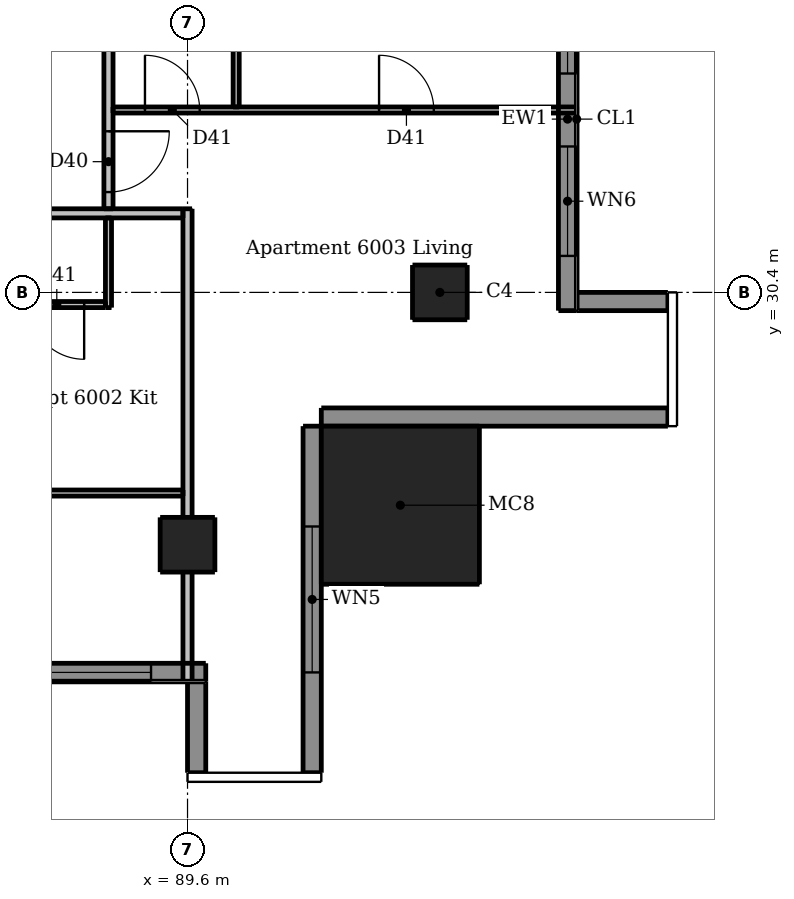
"""IFC4 building model, lengths in metres.
Left out: names, types, materials, properties, quantities, classifications, styles, units other than length and angle.
Written with IfcOpenShell. Run it as: python <this file> out.ifc"""

import sys

from ifc_helpers import new_model, si_unit, direction, frame, frame_2d, origin, origin_2d, place, context, subcontext, project, spatial, rectangle, extrude, element, fill, save


model = new_model("IFC4")
c1 = context("Model", 3, precision=1e-05, world=origin(), true_north=direction((0.0, 1.0)))
c2 = subcontext(c1, "Body", "Model", "MODEL_VIEW")
j1 = project(units=[si_unit("LENGTHUNIT", "METRE"), si_unit("PLANEANGLEUNIT", "RADIAN")], contexts=[c1])
p1 = place(None, origin())
s1 = spatial("IfcSite", under=j1, at=p1, CompositionType="ELEMENT")
p2 = place(p1, origin())
s2 = spatial("IfcBuilding", under=s1, at=p2, CompositionType="ELEMENT")
p3 = place(p2, frame((0.0, 0.0, 223.3)))
s3 = spatial("IfcBuildingStorey", under=s2, at=p3, CompositionType="ELEMENT", Elevation=223.3)
for number, where, z_axis, x_axis in (
    (1, (89.6, 26.25, 0.0), (0.0, 0.0, 1.0), (1.0, 0.0, 0.0)),
    (2, (93.75, 30.4, 0.0), (0.0, 0.0, 1.0), (1.0, 0.0, 0.0)),
):
    element("IfcColumn", number, at=place(p3, frame(where, z_axis=z_axis, x_axis=x_axis)), inside=s3, PredefinedType="COLUMN", context=c2, shape_type="SweptSolid", body=[
        extrude(rectangle(XDim=0.9, YDim=0.9, at=origin_2d()), origin(), (0.0, 0.0, 1.0), 3.05),
    ])
p4 = place(p3, frame((93.1, 26.9, 0.0), z_axis=(0.0, 0.0, 1.0), x_axis=(1.0, 0.0, 0.0)))
e3 = element("IfcColumn", 3, at=p4, inside=s3, PredefinedType="COLUMN", context=c2, shape_type="SweptSolid", body=[
    extrude(rectangle(XDim=2.6, YDim=2.6, at=origin_2d()), origin(), (0.0, 0.0, 1.0), 3.3),
])
p5 = place(p3, frame((89.75, 24.0, 0.0), z_axis=(0.0, 0.0, 1.0), x_axis=(0.0, -1.0, 0.0)))
e4 = element("IfcWall", 4, at=p5, inside=s3, PredefinedType="SOLIDWALL", context=c2, shape_type="SweptSolid", body=[
    extrude(rectangle(XDim=1.5, YDim=0.3, at=frame_2d((0.75, 0.0))), origin(), (0.0, 0.0, 1.0), 3.05),
])
p6 = place(p3, frame((91.65, 22.5, 0.0), z_axis=(0.0, 0.0, 1.0), x_axis=(0.0, 1.0, 0.0)))
e5 = element("IfcWall", 5, at=p6, inside=s3, PredefinedType="SOLIDWALL", context=c2, shape_type="SweptSolid", body=[
    extrude(rectangle(XDim=5.7, YDim=0.3, at=frame_2d((2.85, 0.0))), origin(), (0.0, 0.0, 1.0), 3.05),
])
p7 = place(p6, frame((1.65, 0.0, 0.15)))
e6 = element("IfcOpeningElement", 6, at=p7, cuts=e5, PredefinedType="OPENING", context=c2, shape_type="SweptSolid", body=[
    extrude(rectangle(XDim=2.4, YDim=2.1, at=frame_2d((1.2, 1.05))), frame((0.0, 0.16, 0.0), z_axis=(0.0, -1.0, 0.0), x_axis=(1.0, 0.0, 0.0)), (0.0, 0.0, 1.0), 0.32),
])
p8 = place(p3, frame((91.8, 28.35, 0.0), z_axis=(0.0, 0.0, 1.0), x_axis=(1.0, 0.0, 0.0)))
e7 = element("IfcWall", 7, at=p8, inside=s3, PredefinedType="SOLIDWALL", context=c2, shape_type="SweptSolid", body=[
    extrude(rectangle(XDim=5.7, YDim=0.3, at=frame_2d((2.85, 0.0))), origin(), (0.0, 0.0, 1.0), 3.05),
])
p9 = place(p3, frame((97.5, 30.25, 0.0), z_axis=(0.0, 0.0, 1.0), x_axis=(-1.0, 0.0, 0.0)))
e8 = element("IfcWall", 8, at=p9, inside=s3, PredefinedType="SOLIDWALL", context=c2, shape_type="SweptSolid", body=[
    extrude(rectangle(XDim=1.5, YDim=0.3, at=frame_2d((0.75, 0.0))), origin(), (0.0, 0.0, 1.0), 3.05),
])
p10 = place(p3, frame((83.6, 24.15, 0.0), z_axis=(0.0, 0.0, 1.0), x_axis=(1.0, 0.0, 0.0)))
e9 = element("IfcWall", 9, at=p10, inside=s3, PredefinedType="SOLIDWALL", context=c2, shape_type="SweptSolid", body=[
    extrude(rectangle(XDim=6.3, YDim=0.3, at=frame_2d((3.15, 0.0))), origin(), (0.0, 0.0, 1.0), 3.05),
])
p11 = place(p10, frame((0.6, 0.0, 0.15)))
e10 = element("IfcOpeningElement", 10, at=p11, cuts=e9, PredefinedType="OPENING", context=c2, shape_type="SweptSolid", body=[
    extrude(rectangle(XDim=1.8, YDim=2.1, at=frame_2d((0.9, 1.05))), frame((0.0, 0.16, 0.0), z_axis=(0.0, -1.0, 0.0), x_axis=(1.0, 0.0, 0.0)), (0.0, 0.0, 1.0), 0.32),
])
p12 = place(p10, frame((3.6, 0.0, 0.15)))
e11 = element("IfcOpeningElement", 11, at=p12, cuts=e9, PredefinedType="OPENING", context=c2, shape_type="SweptSolid", body=[
    extrude(rectangle(XDim=1.8, YDim=2.1, at=frame_2d((0.9, 1.05))), frame((0.0, 0.16, 0.0), z_axis=(0.0, -1.0, 0.0), x_axis=(1.0, 0.0, 0.0)), (0.0, 0.0, 1.0), 0.32),
])
p13 = place(p3, frame((95.85, 30.1, 0.0), z_axis=(0.0, 0.0, 1.0), x_axis=(0.0, 1.0, 0.0)))
e12 = element("IfcWall", 12, at=p13, inside=s3, PredefinedType="SOLIDWALL", context=c2, shape_type="SweptSolid", body=[
    extrude(rectangle(XDim=6.3, YDim=0.3, at=frame_2d((3.15, 0.0))), origin(), (0.0, 0.0, 1.0), 3.05),
])
p14 = place(p13, frame((0.9, 0.0, 0.15)))
e13 = element("IfcOpeningElement", 13, at=p14, cuts=e12, PredefinedType="OPENING", context=c2, shape_type="SweptSolid", body=[
    extrude(rectangle(XDim=1.8, YDim=2.1, at=frame_2d((0.9, 1.05))), frame((0.0, 0.16, 0.0), z_axis=(0.0, -1.0, 0.0), x_axis=(1.0, 0.0, 0.0)), (0.0, 0.0, 1.0), 0.32),
])
p15 = place(p13, frame((3.9, 0.0, 0.15)))
e14 = element("IfcOpeningElement", 14, at=p15, cuts=e12, PredefinedType="OPENING", context=c2, shape_type="SweptSolid", body=[
    extrude(rectangle(XDim=1.8, YDim=2.1, at=frame_2d((0.9, 1.05))), frame((0.0, 0.16, 0.0), z_axis=(0.0, -1.0, 0.0), x_axis=(1.0, 0.0, 0.0)), (0.0, 0.0, 1.0), 0.32),
])
p16 = place(p3, frame((88.3, 30.15, 0.0), z_axis=(0.0, 0.0, 1.0), x_axis=(0.0, 1.0, 0.0)))
e15 = element("IfcWall", 15, at=p16, inside=s3, PredefinedType="PARTITIONING", context=c2, shape_type="SweptSolid", body=[
    extrude(rectangle(XDim=1.475, YDim=0.1, at=frame_2d((0.738, 0.0))), origin(), (0.0, 0.0, 1.0), 3.05),
])
p17 = place(p3, frame((90.4, 33.45, 0.0), z_axis=(0.0, 0.0, 1.0), x_axis=(0.0, 1.0, 0.0)))
e16 = element("IfcWall", 16, at=p17, inside=s3, PredefinedType="PARTITIONING", context=c2, shape_type="SweptSolid", body=[
    extrude(rectangle(XDim=5.875, YDim=0.1, at=frame_2d((2.938, 0.0))), origin(), (0.0, 0.0, 1.0), 3.05),
])
p18 = place(p17, frame((3.75, 0.0, 0.0)))
e17 = element("IfcOpeningElement", 17, at=p18, cuts=e16, PredefinedType="OPENING", context=c2, shape_type="SweptSolid", body=[
    extrude(rectangle(XDim=0.8, YDim=2.1, at=frame_2d((0.4, 1.05))), frame((0.0, 0.06, 0.0), z_axis=(0.0, -1.0, 0.0), x_axis=(1.0, 0.0, 0.0)), (0.0, 0.0, 1.0), 0.12),
])
p19 = place(p3, frame((88.375, 33.4, 0.0), z_axis=(0.0, 0.0, 1.0), x_axis=(1.0, 0.0, 0.0)))
e18 = element("IfcWall", 18, at=p19, inside=s3, PredefinedType="PARTITIONING", context=c2, shape_type="SweptSolid", body=[
    extrude(rectangle(XDim=7.625, YDim=0.1, at=frame_2d((3.812, 0.0))), origin(), (0.0, 0.0, 1.0), 3.05),
])
p20 = place(p19, frame((0.525, 0.0, 0.0)))
e19 = element("IfcOpeningElement", 19, at=p20, cuts=e18, PredefinedType="OPENING", context=c2, shape_type="SweptSolid", body=[
    extrude(rectangle(XDim=0.9, YDim=2.1, at=frame_2d((0.45, 1.05))), frame((0.0, 0.06, 0.0), z_axis=(0.0, -1.0, 0.0), x_axis=(1.0, 0.0, 0.0)), (0.0, 0.0, 1.0), 0.12),
])
p21 = place(p19, frame((4.375, 0.0, 0.0)))
e20 = element("IfcOpeningElement", 20, at=p21, cuts=e18, PredefinedType="OPENING", context=c2, shape_type="SweptSolid", body=[
    extrude(rectangle(XDim=0.9, YDim=2.1, at=frame_2d((0.45, 1.05))), frame((0.0, 0.06, 0.0), z_axis=(0.0, -1.0, 0.0), x_axis=(1.0, 0.0, 0.0)), (0.0, 0.0, 1.0), 0.12),
])
p22 = place(p3, frame((88.25, 30.2, 0.0), z_axis=(0.0, 0.0, 1.0), x_axis=(-1.0, 0.0, 0.0)))
e21 = element("IfcWall", 21, at=p22, inside=s3, PredefinedType="PARTITIONING", context=c2, shape_type="SweptSolid", body=[
    extrude(rectangle(XDim=16.575, YDim=0.1, at=frame_2d((8.288, 0.0))), origin(), (0.0, 0.0, 1.0), 3.05),
])
p23 = place(p22, frame((5.7, 0.0, 0.0)))
e22 = element("IfcOpeningElement", 22, at=p23, cuts=e21, PredefinedType="OPENING", context=c2, shape_type="SweptSolid", body=[
    extrude(rectangle(XDim=0.9, YDim=2.1, at=frame_2d((0.45, 1.05))), frame((0.0, 0.06, 0.0), z_axis=(0.0, -1.0, 0.0), x_axis=(1.0, 0.0, 0.0)), (0.0, 0.0, 1.0), 0.12),
])
p24 = place(p22, frame((0.35, 0.0, 0.0)))
e23 = element("IfcOpeningElement", 23, at=p24, cuts=e21, PredefinedType="OPENING", context=c2, shape_type="SweptSolid", body=[
    extrude(rectangle(XDim=0.9, YDim=2.1, at=frame_2d((0.45, 1.05))), frame((0.0, 0.06, 0.0), z_axis=(0.0, -1.0, 0.0), x_axis=(1.0, 0.0, 0.0)), (0.0, 0.0, 1.0), 0.12),
])
p25 = place(p22, frame((2.1, 0.0, 0.0)))
e24 = element("IfcOpeningElement", 24, at=p25, cuts=e21, PredefinedType="OPENING", context=c2, shape_type="SweptSolid", body=[
    extrude(rectangle(XDim=0.9, YDim=2.1, at=frame_2d((0.45, 1.05))), frame((0.0, 0.06, 0.0), z_axis=(0.0, -1.0, 0.0), x_axis=(1.0, 0.0, 0.0)), (0.0, 0.0, 1.0), 0.12),
])
p26 = place(p22, frame((9.35, 0.0, 0.0)))
e25 = element("IfcOpeningElement", 25, at=p26, cuts=e21, PredefinedType="OPENING", context=c2, shape_type="SweptSolid", body=[
    extrude(rectangle(XDim=0.8, YDim=2.1, at=frame_2d((0.4, 1.05))), frame((0.0, 0.06, 0.0), z_axis=(0.0, -1.0, 0.0), x_axis=(1.0, 0.0, 0.0)), (0.0, 0.0, 1.0), 0.12),
])
p27 = place(p22, frame((14.4, 0.0, 0.0)))
e26 = element("IfcOpeningElement", 26, at=p27, cuts=e21, PredefinedType="OPENING", context=c2, shape_type="SweptSolid", body=[
    extrude(rectangle(XDim=0.9, YDim=2.1, at=frame_2d((0.45, 1.05))), frame((0.0, 0.06, 0.0), z_axis=(0.0, -1.0, 0.0), x_axis=(1.0, 0.0, 0.0)), (0.0, 0.0, 1.0), 0.12),
])
p28 = place(p22, frame((11.45, 0.0, 0.0)))
e27 = element("IfcOpeningElement", 27, at=p28, cuts=e21, PredefinedType="OPENING", context=c2, shape_type="SweptSolid", body=[
    extrude(rectangle(XDim=0.8, YDim=2.1, at=frame_2d((0.4, 1.05))), frame((0.0, 0.06, 0.0), z_axis=(0.0, -1.0, 0.0), x_axis=(1.0, 0.0, 0.0)), (0.0, 0.0, 1.0), 0.12),
])
p29 = place(p3, frame((84.85, 27.1, 0.0), z_axis=(0.0, 0.0, 1.0), x_axis=(1.0, 0.0, 0.0)))
e28 = element("IfcWall", 28, at=p29, inside=s3, PredefinedType="PARTITIONING", context=c2, shape_type="SweptSolid", body=[
    extrude(rectangle(XDim=4.675, YDim=0.1, at=frame_2d((2.337, 0.0))), origin(), (0.0, 0.0, 1.0), 3.05),
])
p30 = place(p3, frame((88.3, 61.175, 0.0), z_axis=(0.0, 0.0, 1.0), x_axis=(0.0, -1.0, 0.0)))
e29 = element("IfcWall", 29, at=p30, inside=s3, PredefinedType="PARTITIONING", context=c2, shape_type="SweptSolid", body=[
    extrude(rectangle(XDim=29.4, YDim=0.15, at=frame_2d((14.7, 0.0))), origin(), (0.0, 0.0, 1.0), 3.05),
])
p31 = place(p30, frame((28.125, 0.0, 0.0)))
e30 = element("IfcOpeningElement", 30, at=p31, cuts=e29, PredefinedType="OPENING", context=c2, shape_type="SweptSolid", body=[
    extrude(rectangle(XDim=1.0, YDim=2.1, at=frame_2d((0.5, 1.05))), frame((0.0, 0.085, 0.0), z_axis=(0.0, -1.0, 0.0), x_axis=(1.0, 0.0, 0.0)), (0.0, 0.0, 1.0), 0.17),
])
p32 = place(p30, frame((10.775, 0.0, 0.0)))
e31 = element("IfcOpeningElement", 31, at=p32, cuts=e29, PredefinedType="OPENING", context=c2, shape_type="SweptSolid", body=[
    extrude(rectangle(XDim=1.0, YDim=2.1, at=frame_2d((0.5, 1.05))), frame((0.0, 0.085, 0.0), z_axis=(0.0, -1.0, 0.0), x_axis=(1.0, 0.0, 0.0)), (0.0, 0.0, 1.0), 0.17),
])
p33 = place(p3, frame((89.6, 24.0, 0.0), z_axis=(0.0, 0.0, 1.0), x_axis=(0.0, 1.0, 0.0)))
e32 = element("IfcWall", 32, at=p33, inside=s3, PredefinedType="PARTITIONING", context=c2, shape_type="SweptSolid", body=[
    extrude(rectangle(XDim=7.775, YDim=0.15, at=frame_2d((3.887, 0.0))), origin(), (0.0, 0.0, 1.0), 2.516),
])
p34 = place(p3, frame((89.525, 31.7, 0.0), z_axis=(0.0, 0.0, 1.0), x_axis=(-1.0, 0.0, 0.0)))
e33 = element("IfcWall", 33, at=p34, inside=s3, PredefinedType="PARTITIONING", context=c2, shape_type="SweptSolid", body=[
    extrude(rectangle(XDim=30.55, YDim=0.15, at=frame_2d((15.275, 0.0))), origin(), (0.0, 0.0, 1.0), 3.05),
])
p35 = place(p34, frame((26.775, 0.0, 0.0)))
e34 = element("IfcOpeningElement", 34, at=p35, cuts=e33, PredefinedType="OPENING", context=c2, shape_type="SweptSolid", body=[
    extrude(rectangle(XDim=1.0, YDim=2.1, at=frame_2d((0.5, 1.05))), frame((0.0, 0.085, 0.0), z_axis=(0.0, -1.0, 0.0), x_axis=(1.0, 0.0, 0.0)), (0.0, 0.0, 1.0), 0.17),
])
p36 = place(p34, frame((9.075, 0.0, 0.0)))
e35 = element("IfcOpeningElement", 35, at=p36, cuts=e33, PredefinedType="OPENING", context=c2, shape_type="SweptSolid", body=[
    extrude(rectangle(XDim=1.0, YDim=2.1, at=frame_2d((0.5, 1.05))), frame((0.0, 0.085, 0.0), z_axis=(0.0, -1.0, 0.0), x_axis=(1.0, 0.0, 0.0)), (0.0, 0.0, 1.0), 0.17),
])
p37 = place(p7, origin())
e36 = element("IfcWindow", 36, at=p37, inside=s3, PartitioningType="DOUBLE_PANEL_VERTICAL", PredefinedType="WINDOW", context=c2, shape_type="SweptSolid", body=[
    extrude(rectangle(XDim=2.4, YDim=2.1, at=frame_2d((1.2, 1.05))), frame((0.0, 0.03, 0.0), z_axis=(0.0, -1.0, 0.0), x_axis=(1.0, 0.0, 0.0)), (0.0, 0.0, 1.0), 0.06),
])
fill(e6, e36)
p38 = place(p12, origin())
e37 = element("IfcWindow", 37, at=p38, inside=s3, PartitioningType="DOUBLE_PANEL_VERTICAL", PredefinedType="WINDOW", context=c2, shape_type="SweptSolid", body=[
    extrude(rectangle(XDim=1.8, YDim=2.1, at=frame_2d((0.9, 1.05))), frame((0.0, 0.03, 0.0), z_axis=(0.0, -1.0, 0.0), x_axis=(1.0, 0.0, 0.0)), (0.0, 0.0, 1.0), 0.06),
])
fill(e11, e37)
p39 = place(p14, origin())
e38 = element("IfcWindow", 38, at=p39, inside=s3, PartitioningType="DOUBLE_PANEL_VERTICAL", PredefinedType="WINDOW", context=c2, shape_type="SweptSolid", body=[
    extrude(rectangle(XDim=1.8, YDim=2.1, at=frame_2d((0.9, 1.05))), frame((0.0, 0.03, 0.0), z_axis=(0.0, -1.0, 0.0), x_axis=(1.0, 0.0, 0.0)), (0.0, 0.0, 1.0), 0.06),
])
fill(e13, e38)
p40 = place(p15, origin())
e39 = element("IfcWindow", 39, at=p40, inside=s3, PartitioningType="DOUBLE_PANEL_VERTICAL", PredefinedType="WINDOW", context=c2, shape_type="SweptSolid", body=[
    extrude(rectangle(XDim=1.8, YDim=2.1, at=frame_2d((0.9, 1.05))), frame((0.0, 0.03, 0.0), z_axis=(0.0, -1.0, 0.0), x_axis=(1.0, 0.0, 0.0)), (0.0, 0.0, 1.0), 0.06),
])
fill(e14, e39)
p41 = place(p24, origin())
e40 = element("IfcDoor", 40, at=p41, inside=s3, OperationType="SINGLE_SWING_LEFT", PredefinedType="DOOR", context=c2, shape_type="SweptSolid", body=[
    extrude(rectangle(XDim=0.9, YDim=2.1, at=frame_2d((0.45, 1.05))), frame((0.0, 0.025, 0.0), z_axis=(0.0, -1.0, 0.0), x_axis=(1.0, 0.0, 0.0)), (0.0, 0.0, 1.0), 0.05),
])
fill(e23, e40)
p42 = place(p31, origin())
e41 = element("IfcDoor", 41, at=p42, inside=s3, OperationType="SINGLE_SWING_LEFT", PredefinedType="DOOR", context=c2, shape_type="SweptSolid", body=[
    extrude(rectangle(XDim=1.0, YDim=2.1, at=frame_2d((0.5, 1.05))), frame((0.0, 0.025, 0.0), z_axis=(0.0, -1.0, 0.0), x_axis=(1.0, 0.0, 0.0)), (0.0, 0.0, 1.0), 0.05),
])
fill(e30, e41)
p43 = place(p20, origin())
e42 = element("IfcDoor", 42, at=p43, inside=s3, OperationType="SINGLE_SWING_LEFT", PredefinedType="DOOR", context=c2, shape_type="SweptSolid", body=[
    extrude(rectangle(XDim=0.9, YDim=2.1, at=frame_2d((0.45, 1.05))), frame((0.0, 0.025, 0.0), z_axis=(0.0, -1.0, 0.0), x_axis=(1.0, 0.0, 0.0)), (0.0, 0.0, 1.0), 0.05),
])
fill(e19, e42)
p44 = place(p21, origin())
e43 = element("IfcDoor", 43, at=p44, inside=s3, OperationType="SINGLE_SWING_LEFT", PredefinedType="DOOR", context=c2, shape_type="SweptSolid", body=[
    extrude(rectangle(XDim=0.9, YDim=2.1, at=frame_2d((0.45, 1.05))), frame((0.0, 0.025, 0.0), z_axis=(0.0, -1.0, 0.0), x_axis=(1.0, 0.0, 0.0)), (0.0, 0.0, 1.0), 0.05),
])
fill(e20, e43)
save(model, sys.argv[1])
